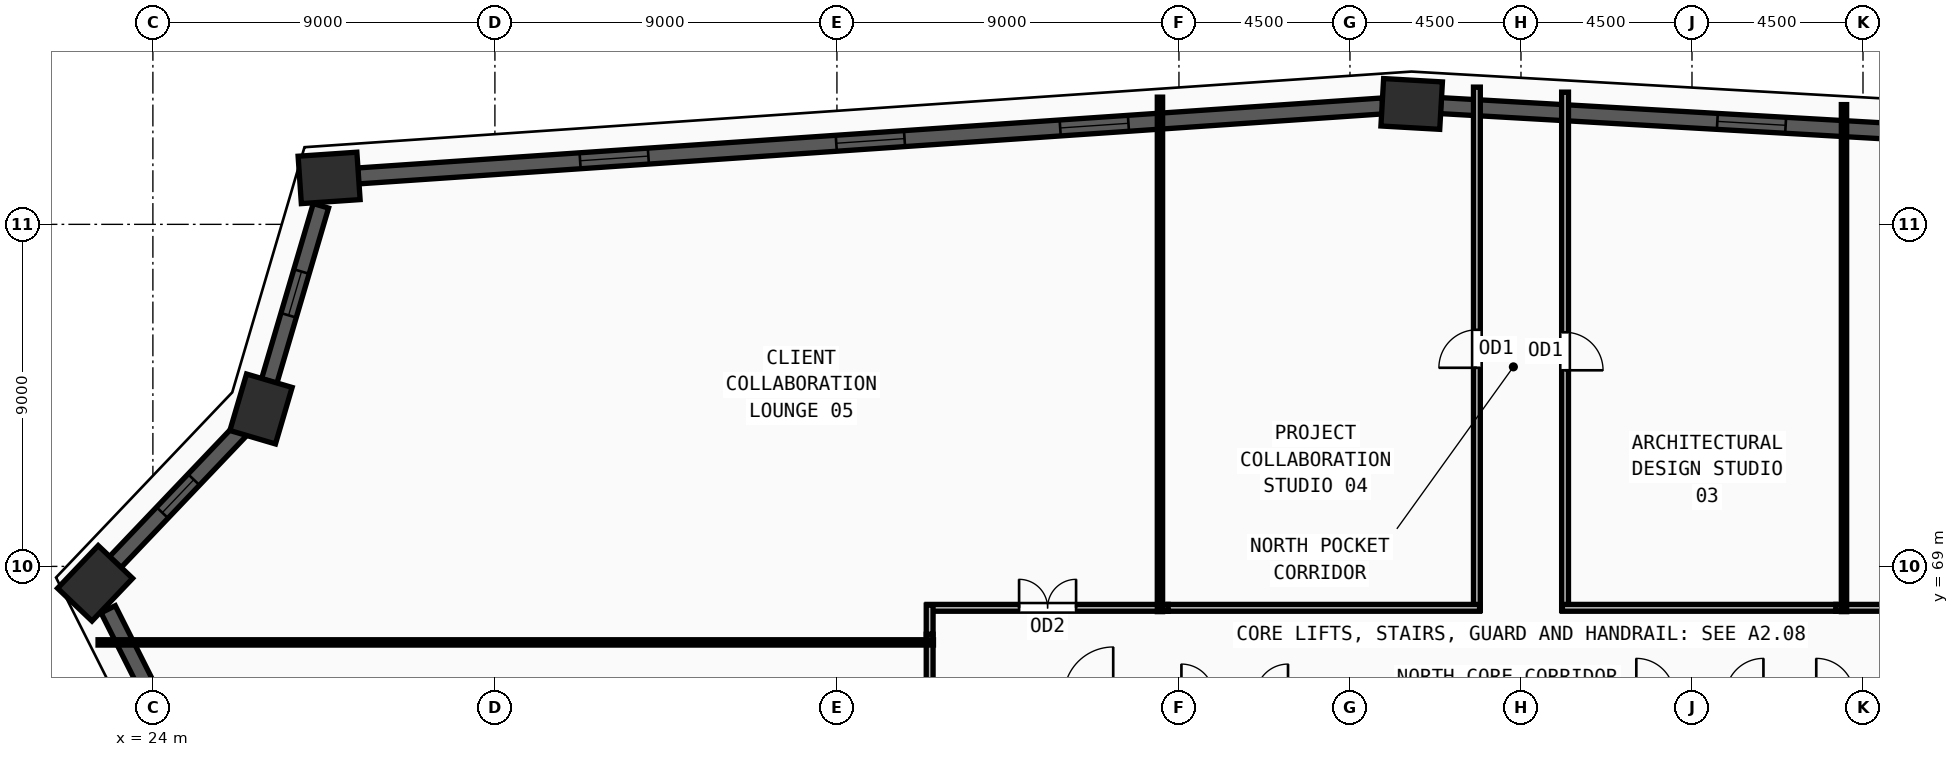
"""IFC4 building model, lengths in metres.
Left out: names, types, materials, properties, quantities, classifications, styles, units other than length and angle.
Written with IfcOpenShell. Run it as: python <this file> out.ifc"""

import sys

from ifc_helpers import new_model, si_unit, direction, frame, frame_2d, origin, origin_2d, place, context, subcontext, project, spatial, rectangle, extrude, source, transform, mapped, element, fill, save


model = new_model("IFC4")
c1 = context("Model", 3, precision=1e-05, world=origin(), true_north=direction((0.0, 1.0)))
c2 = subcontext(c1, "Body", "Model", "MODEL_VIEW")
j1 = project(units=[si_unit("LENGTHUNIT", "METRE"), si_unit("PLANEANGLEUNIT", "RADIAN")], contexts=[c1])
p1 = place(None, origin())
s1 = spatial("IfcSite", under=j1, at=p1, CompositionType="ELEMENT")
p2 = place(p1, origin())
s2 = spatial("IfcBuilding", under=s1, at=p2, CompositionType="ELEMENT")
p3 = place(p2, frame((0.0, 0.0, 85.5)))
s3 = spatial("IfcBuildingStorey", under=s2, at=p3, CompositionType="ELEMENT", Elevation=85.5)
m1 = source(origin(), c2, "Body", "SweptSolid", [
    extrude(rectangle(XDim=1.55, YDim=1.25, at=origin_2d()), origin(), (0.0, 0.0, 1.0), 3.75),
])
for number, where, z_axis, x_axis in (
    (1, (22.479, 68.555, 0.0), (0.0, 0.0, 1.0), (0.689, 0.724, 0.0)),
    (2, (26.845, 73.142, 0.0), (0.0, 0.0, 1.0), (0.283, 0.959, 0.0)),
    (3, (28.637, 79.222, 0.0), (0.0, 0.0, 1.0), (0.998, 0.068, 0.0)),
    (4, (57.124, 81.168, 0.0), (0.0, 0.0, 1.0), (-0.998, 0.057, 0.0)),
):
    element("IfcColumn", number, at=place(p3, frame(where, z_axis=z_axis, x_axis=x_axis)), inside=s3, PredefinedType="COLUMN", context=c2, shape_type="MappedRepresentation", body=[
        mapped(m1, transform((0.0, 0.0, 0.0), x_axis=(1.0, 0.0, 0.0), y_axis=(0.0, 1.0, 0.0), z_axis=(0.0, 0.0, 1.0), scale=1.0)),
    ])
p4 = place(p3, frame((90.601, 79.259, 0.0), z_axis=(0.0, 0.0, 1.0), x_axis=(-0.99837885552, 0.056918018682, 0.0)))
e5 = element("IfcWall", 5, at=p4, inside=s3, PredefinedType="SOLIDWALL", context=c2, shape_type="SweptSolid", body=[
    extrude(rectangle(XDim=32.766, YDim=0.42, at=frame_2d((16.383, 0.0))), origin(), (0.0, 0.0, 1.0), 3.57),
])
m2 = source(origin(), c2, "Body", "SweptSolid", [
    extrude(rectangle(XDim=1.8, YDim=1.95, at=frame_2d((0.9, 0.975))), frame((0.0, 0.22, 0.0), z_axis=(0.0, -1.0, 0.0), x_axis=(1.0, 0.0, 0.0)), (0.0, 0.0, 1.0), 0.44),
])
p5 = place(p4, frame((7.292, 0.0, 0.55)))
e6 = element("IfcOpeningElement", 6, at=p5, cuts=e5, PredefinedType="OPENING", context=c2, shape_type="MappedRepresentation", body=[
    mapped(m2, transform((0.0, 0.0, 0.0), x_axis=(1.0, 0.0, 0.0), y_axis=(0.0, 1.0, 0.0), z_axis=(0.0, 0.0, 1.0), scale=1.0)),
])
p6 = place(p4, frame((15.483, 0.0, 0.55)))
e7 = element("IfcOpeningElement", 7, at=p6, cuts=e5, PredefinedType="OPENING", context=c2, shape_type="MappedRepresentation", body=[
    mapped(m2, transform((0.0, 0.0, 0.0), x_axis=(1.0, 0.0, 0.0), y_axis=(0.0, 1.0, 0.0), z_axis=(0.0, 0.0, 1.0), scale=1.0)),
])
p7 = place(p4, frame((23.675, 0.0, 0.55)))
e8 = element("IfcOpeningElement", 8, at=p7, cuts=e5, PredefinedType="OPENING", context=c2, shape_type="MappedRepresentation", body=[
    mapped(m2, transform((0.0, 0.0, 0.0), x_axis=(1.0, 0.0, 0.0), y_axis=(0.0, 1.0, 0.0), z_axis=(0.0, 0.0, 1.0), scale=1.0)),
])
p8 = place(p3, frame((56.361, 81.116, 0.0), z_axis=(0.0, 0.0, 1.0), x_axis=(-0.997674193577, -0.068163065302, 0.0)))
e9 = element("IfcWall", 9, at=p8, inside=s3, PredefinedType="SOLIDWALL", context=c2, shape_type="SweptSolid", body=[
    extrude(rectangle(XDim=27.024, YDim=0.42, at=frame_2d((13.512, 0.0))), origin(), (0.0, 0.0, 1.0), 3.57),
])
p9 = place(p8, frame((6.706, 0.0, 0.55)))
e10 = element("IfcOpeningElement", 10, at=p9, cuts=e9, PredefinedType="OPENING", context=c2, shape_type="MappedRepresentation", body=[
    mapped(m2, transform((0.0, 0.0, 0.0), x_axis=(1.0, 0.0, 0.0), y_axis=(0.0, 1.0, 0.0), z_axis=(0.0, 0.0, 1.0), scale=1.0)),
])
p10 = place(p8, frame((12.612, 0.0, 0.55)))
e11 = element("IfcOpeningElement", 11, at=p10, cuts=e9, PredefinedType="OPENING", context=c2, shape_type="MappedRepresentation", body=[
    mapped(m2, transform((0.0, 0.0, 0.0), x_axis=(1.0, 0.0, 0.0), y_axis=(0.0, 1.0, 0.0), z_axis=(0.0, 0.0, 1.0), scale=1.0)),
])
p11 = place(p8, frame((19.368, 0.0, 0.55)))
e12 = element("IfcOpeningElement", 12, at=p11, cuts=e9, PredefinedType="OPENING", context=c2, shape_type="MappedRepresentation", body=[
    mapped(m2, transform((0.0, 0.0, 0.0), x_axis=(1.0, 0.0, 0.0), y_axis=(0.0, 1.0, 0.0), z_axis=(0.0, 0.0, 1.0), scale=1.0)),
])
p12 = place(p3, frame((28.421, 78.488, 0.0), z_axis=(0.0, 0.0, 1.0), x_axis=(-0.282812256526, -0.959175285106, 0.0)))
e13 = element("IfcWall", 13, at=p12, inside=s3, PredefinedType="SOLIDWALL", context=c2, shape_type="SweptSolid", body=[
    extrude(rectangle(XDim=4.808, YDim=0.42, at=frame_2d((2.404, 0.0))), origin(), (0.0, 0.0, 1.0), 3.57),
])
m3 = source(origin(), c2, "Body", "SweptSolid", [
    extrude(rectangle(XDim=1.2, YDim=1.9, at=frame_2d((0.6, 0.95))), frame((0.0, 0.22, 0.0), z_axis=(0.0, -1.0, 0.0), x_axis=(1.0, 0.0, 0.0)), (0.0, 0.0, 1.0), 0.44),
])
p13 = place(p12, frame((1.804, 0.0, 0.55)))
e14 = element("IfcOpeningElement", 14, at=p13, cuts=e13, PredefinedType="OPENING", context=c2, shape_type="MappedRepresentation", body=[
    mapped(m3, transform((0.0, 0.0, 0.0), x_axis=(1.0, 0.0, 0.0), y_axis=(0.0, 1.0, 0.0), z_axis=(0.0, 0.0, 1.0), scale=1.0)),
])
p14 = place(p3, frame((26.318, 72.588, 0.0), z_axis=(0.0, 0.0, 1.0), x_axis=(-0.689510475748, -0.724275709819, 0.0)))
e15 = element("IfcWall", 15, at=p14, inside=s3, PredefinedType="SOLIDWALL", context=c2, shape_type="SweptSolid", body=[
    extrude(rectangle(XDim=4.803, YDim=0.42, at=frame_2d((2.402, 0.0))), origin(), (0.0, 0.0, 1.0), 3.57),
])
p15 = place(p14, frame((1.802, 0.0, 0.55)))
e16 = element("IfcOpeningElement", 16, at=p15, cuts=e15, PredefinedType="OPENING", context=c2, shape_type="MappedRepresentation", body=[
    mapped(m3, transform((0.0, 0.0, 0.0), x_axis=(1.0, 0.0, 0.0), y_axis=(0.0, 1.0, 0.0), z_axis=(0.0, 0.0, 1.0), scale=1.0)),
])
p16 = place(p3, frame((22.823, 67.872, 0.0), z_axis=(0.0, 0.0, 1.0), x_axis=(0.449893825909, -0.893082048531, 0.0)))
e17 = element("IfcWall", 17, at=p16, inside=s3, PredefinedType="SOLIDWALL", context=c2, shape_type="SweptSolid", body=[
    extrude(rectangle(XDim=32.768, YDim=0.42, at=frame_2d((16.384, 0.0))), origin(), (0.0, 0.0, 1.0), 3.57),
])
p17 = place(p16, frame((9.492, 0.0, 0.55)))
e18 = element("IfcOpeningElement", 18, at=p17, cuts=e17, PredefinedType="OPENING", context=c2, shape_type="MappedRepresentation", body=[
    mapped(m2, transform((0.0, 0.0, 0.0), x_axis=(1.0, 0.0, 0.0), y_axis=(0.0, 1.0, 0.0), z_axis=(0.0, 0.0, 1.0), scale=1.0)),
])
p18 = place(p16, frame((15.484, 0.0, 0.55)))
e19 = element("IfcOpeningElement", 19, at=p18, cuts=e17, PredefinedType="OPENING", context=c2, shape_type="MappedRepresentation", body=[
    mapped(m2, transform((0.0, 0.0, 0.0), x_axis=(1.0, 0.0, 0.0), y_axis=(0.0, 1.0, 0.0), z_axis=(0.0, 0.0, 1.0), scale=1.0)),
])
p19 = place(p3, frame((68.285, 67.91, 0.0), z_axis=(0.0, 0.0, 1.0), x_axis=(1.0, 0.0, 0.0)))
e20 = element("IfcWall", 20, at=p19, inside=s3, PredefinedType="PARTITIONING", context=c2, shape_type="SweptSolid", body=[
    extrude(rectangle(XDim=7.345, YDim=0.18, at=frame_2d((3.672, 0.0))), origin(), (0.0, 0.0, 1.0), 3.57),
])
m4 = source(origin(), c2, "Body", "SweptSolid", [
    extrude(rectangle(XDim=1.5, YDim=2.2, at=frame_2d((0.75, 1.1))), frame((0.0, 0.1, 0.0), z_axis=(0.0, -1.0, 0.0), x_axis=(1.0, 0.0, 0.0)), (0.0, 0.0, 1.0), 0.2),
])
p20 = place(p19, frame((2.922, 0.0, 0.0)))
e21 = element("IfcOpeningElement", 21, at=p20, cuts=e20, PredefinedType="OPENING", context=c2, shape_type="MappedRepresentation", body=[
    mapped(m4, transform((0.0, 0.0, 0.0), x_axis=(1.0, 0.0, 0.0), y_axis=(0.0, 1.0, 0.0), z_axis=(0.0, 0.0, 1.0), scale=1.0)),
])
p21 = place(p3, frame((61.16, 81.479, 0.0), z_axis=(0.0, 0.0, 1.0), x_axis=(0.0, -1.0, 0.0)))
e22 = element("IfcWall", 22, at=p21, inside=s3, PredefinedType="PARTITIONING", context=c2, shape_type="SweptSolid", body=[
    extrude(rectangle(XDim=13.639, YDim=0.18, at=frame_2d((6.819, 0.0))), origin(), (0.0, 0.0, 1.0), 3.57),
])
m5 = source(origin(), c2, "Body", "SweptSolid", [
    extrude(rectangle(XDim=1.0, YDim=2.2, at=frame_2d((0.5, 1.1))), frame((0.0, 0.1, 0.0), z_axis=(0.0, -1.0, 0.0), x_axis=(1.0, 0.0, 0.0)), (0.0, 0.0, 1.0), 0.2),
])
p22 = place(p21, frame((6.319, 0.0, 0.0)))
e23 = element("IfcOpeningElement", 23, at=p22, cuts=e22, PredefinedType="OPENING", context=c2, shape_type="MappedRepresentation", body=[
    mapped(m5, transform((0.0, 0.0, 0.0), x_axis=(1.0, 0.0, 0.0), y_axis=(0.0, 1.0, 0.0), z_axis=(0.0, 0.0, 1.0), scale=1.0)),
])
p23 = place(p3, frame((58.84, 67.84, 0.0), z_axis=(0.0, 0.0, 1.0), x_axis=(0.0, 1.0, 0.0)))
e24 = element("IfcWall", 24, at=p23, inside=s3, PredefinedType="PARTITIONING", context=c2, shape_type="SweptSolid", body=[
    extrude(rectangle(XDim=13.771, YDim=0.18, at=frame_2d((6.885, 0.0))), origin(), (0.0, 0.0, 1.0), 3.57),
])
p24 = place(p23, frame((6.386, 0.0, 0.0)))
e25 = element("IfcOpeningElement", 25, at=p24, cuts=e24, PredefinedType="OPENING", context=c2, shape_type="MappedRepresentation", body=[
    mapped(m5, transform((0.0, 0.0, 0.0), x_axis=(1.0, 0.0, 0.0), y_axis=(0.0, 1.0, 0.0), z_axis=(0.0, 0.0, 1.0), scale=1.0)),
])
p25 = place(p3, frame((44.37, 67.91, 0.0), z_axis=(0.0, 0.0, 1.0), x_axis=(1.0, 0.0, 0.0)))
e26 = element("IfcWall", 26, at=p25, inside=s3, PredefinedType="PARTITIONING", context=c2, shape_type="SweptSolid", body=[
    extrude(rectangle(XDim=6.345, YDim=0.18, at=frame_2d((3.172, 0.0))), origin(), (0.0, 0.0, 1.0), 3.57),
])
p26 = place(p25, frame((2.423, 0.0, 0.0)))
e27 = element("IfcOpeningElement", 27, at=p26, cuts=e26, PredefinedType="OPENING", context=c2, shape_type="MappedRepresentation", body=[
    mapped(m4, transform((0.0, 0.0, 0.0), x_axis=(1.0, 0.0, 0.0), y_axis=(0.0, 1.0, 0.0), z_axis=(0.0, 0.0, 1.0), scale=1.0)),
])
p27 = place(p3, frame((44.44, 60.285, 0.0), z_axis=(0.0, 0.0, 1.0), x_axis=(0.0, 1.0, 0.0)))
e28 = element("IfcWall", 28, at=p27, inside=s3, PredefinedType="PARTITIONING", context=c2, shape_type="SweptSolid", body=[
    extrude(rectangle(XDim=6.93, YDim=0.18, at=frame_2d((3.465, 0.0))), origin(), (0.0, 0.0, 1.0), 3.57),
])
p28 = place(p27, frame((2.715, 0.0, 0.0)))
e29 = element("IfcOpeningElement", 29, at=p28, cuts=e28, PredefinedType="OPENING", context=c2, shape_type="MappedRepresentation", body=[
    mapped(m4, transform((0.0, 0.0, 0.0), x_axis=(1.0, 0.0, 0.0), y_axis=(0.0, 1.0, 0.0), z_axis=(0.0, 0.0, 1.0), scale=1.0)),
])
p29 = place(p3, frame((61.09, 67.91, 0.0), z_axis=(0.0, 0.0, 1.0), x_axis=(1.0, 0.0, 0.0)))
e30 = element("IfcWall", 30, at=p29, inside=s3, PredefinedType="PARTITIONING", context=c2, shape_type="SweptSolid", body=[
    extrude(rectangle(XDim=7.195, YDim=0.18, at=frame_2d((3.597, 0.0))), origin(), (0.0, 0.0, 1.0), 3.57),
])
p30 = place(p3, frame((50.715, 67.91, 0.0), z_axis=(0.0, 0.0, 1.0), x_axis=(1.0, 0.0, 0.0)))
e31 = element("IfcWall", 31, at=p30, inside=s3, PredefinedType="PARTITIONING", context=c2, shape_type="SweptSolid", body=[
    extrude(rectangle(XDim=8.195, YDim=0.18, at=frame_2d((4.097, 0.0))), origin(), (0.0, 0.0, 1.0), 3.57),
])
p31 = place(p3, frame((44.44, 67.215, 0.0), z_axis=(0.0, 0.0, 1.0), x_axis=(0.0, 1.0, 0.0)))
e32 = element("IfcWall", 32, at=p31, inside=s3, PredefinedType="PARTITIONING", context=c2, shape_type="SweptSolid", body=[
    extrude(rectangle(XDim=0.765, YDim=0.18, at=frame_2d((0.382, 0.0))), origin(), (0.0, 0.0, 1.0), 3.57),
])
p32 = place(p3, frame((44.54, 67.0, 0.0), z_axis=(0.0, 0.0, 1.0), x_axis=(-1.0, 0.0, 0.0)))
e33 = element("IfcWall", 33, at=p32, inside=s3, PredefinedType="PARTITIONING", context=c2, shape_type="SweptSolid", body=[
    extrude(rectangle(XDim=21.983, YDim=0.14, at=frame_2d((10.992, 0.0))), origin(), (0.0, 0.0, 1.0), 2.655),
])
p33 = place(p3, frame((50.5, 67.81, 0.0), z_axis=(0.0, 0.0, 1.0), x_axis=(0.0, 1.0, 0.0)))
e34 = element("IfcWall", 34, at=p33, inside=s3, PredefinedType="PARTITIONING", context=c2, shape_type="SweptSolid", body=[
    extrude(rectangle(XDim=13.537, YDim=0.14, at=frame_2d((6.769, 0.0))), origin(), (0.0, 0.0, 1.0), 3.57),
])
p34 = place(p3, frame((68.5, 67.81, 0.0), z_axis=(0.0, 0.0, 1.0), x_axis=(0.0, 1.0, 0.0)))
e35 = element("IfcWall", 35, at=p34, inside=s3, PredefinedType="PARTITIONING", context=c2, shape_type="SweptSolid", body=[
    extrude(rectangle(XDim=13.341, YDim=0.14, at=frame_2d((6.67, 0.0))), origin(), (0.0, 0.0, 1.0), 3.57),
])
m6 = source(origin(), c2, "Body", "SweptSolid", [
    extrude(rectangle(XDim=1.8, YDim=1.95, at=frame_2d((0.9, 0.975))), frame((0.0, 0.03, 0.0), z_axis=(0.0, -1.0, 0.0), x_axis=(1.0, 0.0, 0.0)), (0.0, 0.0, 1.0), 0.06),
])
p35 = place(p7, origin())
e36 = element("IfcWindow", 36, at=p35, inside=s3, PartitioningType="DOUBLE_PANEL_VERTICAL", PredefinedType="WINDOW", context=c2, shape_type="MappedRepresentation", body=[
    mapped(m6, transform((0.0, 0.0, 0.0), x_axis=(1.0, 0.0, 0.0), y_axis=(0.0, 1.0, 0.0), z_axis=(0.0, 0.0, 1.0), scale=1.0)),
])
fill(e8, e36)
p36 = place(p9, origin())
e37 = element("IfcWindow", 37, at=p36, inside=s3, PartitioningType="DOUBLE_PANEL_VERTICAL", PredefinedType="WINDOW", context=c2, shape_type="MappedRepresentation", body=[
    mapped(m6, transform((0.0, 0.0, 0.0), x_axis=(1.0, 0.0, 0.0), y_axis=(0.0, 1.0, 0.0), z_axis=(0.0, 0.0, 1.0), scale=1.0)),
])
fill(e10, e37)
p37 = place(p10, origin())
e38 = element("IfcWindow", 38, at=p37, inside=s3, PartitioningType="DOUBLE_PANEL_VERTICAL", PredefinedType="WINDOW", context=c2, shape_type="MappedRepresentation", body=[
    mapped(m6, transform((0.0, 0.0, 0.0), x_axis=(1.0, 0.0, 0.0), y_axis=(0.0, 1.0, 0.0), z_axis=(0.0, 0.0, 1.0), scale=1.0)),
])
fill(e11, e38)
p38 = place(p11, origin())
e39 = element("IfcWindow", 39, at=p38, inside=s3, PartitioningType="DOUBLE_PANEL_VERTICAL", PredefinedType="WINDOW", context=c2, shape_type="MappedRepresentation", body=[
    mapped(m6, transform((0.0, 0.0, 0.0), x_axis=(1.0, 0.0, 0.0), y_axis=(0.0, 1.0, 0.0), z_axis=(0.0, 0.0, 1.0), scale=1.0)),
])
fill(e12, e39)
m7 = source(origin(), c2, "Body", "SweptSolid", [
    extrude(rectangle(XDim=1.2, YDim=1.9, at=frame_2d((0.6, 0.95))), frame((0.0, 0.03, 0.0), z_axis=(0.0, -1.0, 0.0), x_axis=(1.0, 0.0, 0.0)), (0.0, 0.0, 1.0), 0.06),
])
p39 = place(p13, origin())
e40 = element("IfcWindow", 40, at=p39, inside=s3, PartitioningType="SINGLE_PANEL", PredefinedType="WINDOW", context=c2, shape_type="MappedRepresentation", body=[
    mapped(m7, transform((0.0, 0.0, 0.0), x_axis=(1.0, 0.0, 0.0), y_axis=(0.0, 1.0, 0.0), z_axis=(0.0, 0.0, 1.0), scale=1.0)),
])
fill(e14, e40)
p40 = place(p15, origin())
e41 = element("IfcWindow", 41, at=p40, inside=s3, PartitioningType="SINGLE_PANEL", PredefinedType="WINDOW", context=c2, shape_type="MappedRepresentation", body=[
    mapped(m7, transform((0.0, 0.0, 0.0), x_axis=(1.0, 0.0, 0.0), y_axis=(0.0, 1.0, 0.0), z_axis=(0.0, 0.0, 1.0), scale=1.0)),
])
fill(e16, e41)
m8 = source(origin(), c2, "Body", "SweptSolid", [
    extrude(rectangle(XDim=1.0, YDim=2.2, at=frame_2d((0.5, 1.1))), frame((0.0, 0.025, 0.0), z_axis=(0.0, -1.0, 0.0), x_axis=(1.0, 0.0, 0.0)), (0.0, 0.0, 1.0), 0.05),
])
p41 = place(p22, origin())
e42 = element("IfcDoor", 42, at=p41, inside=s3, OperationType="SINGLE_SWING_RIGHT", PredefinedType="DOOR", context=c2, shape_type="MappedRepresentation", body=[
    mapped(m8, transform((0.0, 0.0, 0.0), x_axis=(1.0, 0.0, 0.0), y_axis=(0.0, 1.0, 0.0), z_axis=(0.0, 0.0, 1.0), scale=1.0)),
])
fill(e23, e42)
p42 = place(p24, origin())
e43 = element("IfcDoor", 43, at=p42, inside=s3, OperationType="SINGLE_SWING_LEFT", PredefinedType="DOOR", context=c2, shape_type="MappedRepresentation", body=[
    mapped(m8, transform((0.0, 0.0, 0.0), x_axis=(1.0, 0.0, 0.0), y_axis=(0.0, 1.0, 0.0), z_axis=(0.0, 0.0, 1.0), scale=1.0)),
])
fill(e25, e43)
m9 = source(origin(), c2, "Body", "SweptSolid", [
    extrude(rectangle(XDim=1.5, YDim=2.2, at=frame_2d((0.75, 1.1))), frame((0.0, 0.025, 0.0), z_axis=(0.0, -1.0, 0.0), x_axis=(1.0, 0.0, 0.0)), (0.0, 0.0, 1.0), 0.05),
])
p43 = place(p26, origin())
e44 = element("IfcDoor", 44, at=p43, inside=s3, OperationType="DOUBLE_DOOR_SINGLE_SWING", PredefinedType="DOOR", context=c2, shape_type="MappedRepresentation", body=[
    mapped(m9, transform((0.0, 0.0, 0.0), x_axis=(1.0, 0.0, 0.0), y_axis=(0.0, 1.0, 0.0), z_axis=(0.0, 0.0, 1.0), scale=1.0)),
])
fill(e27, e44)
save(model, sys.argv[1])
